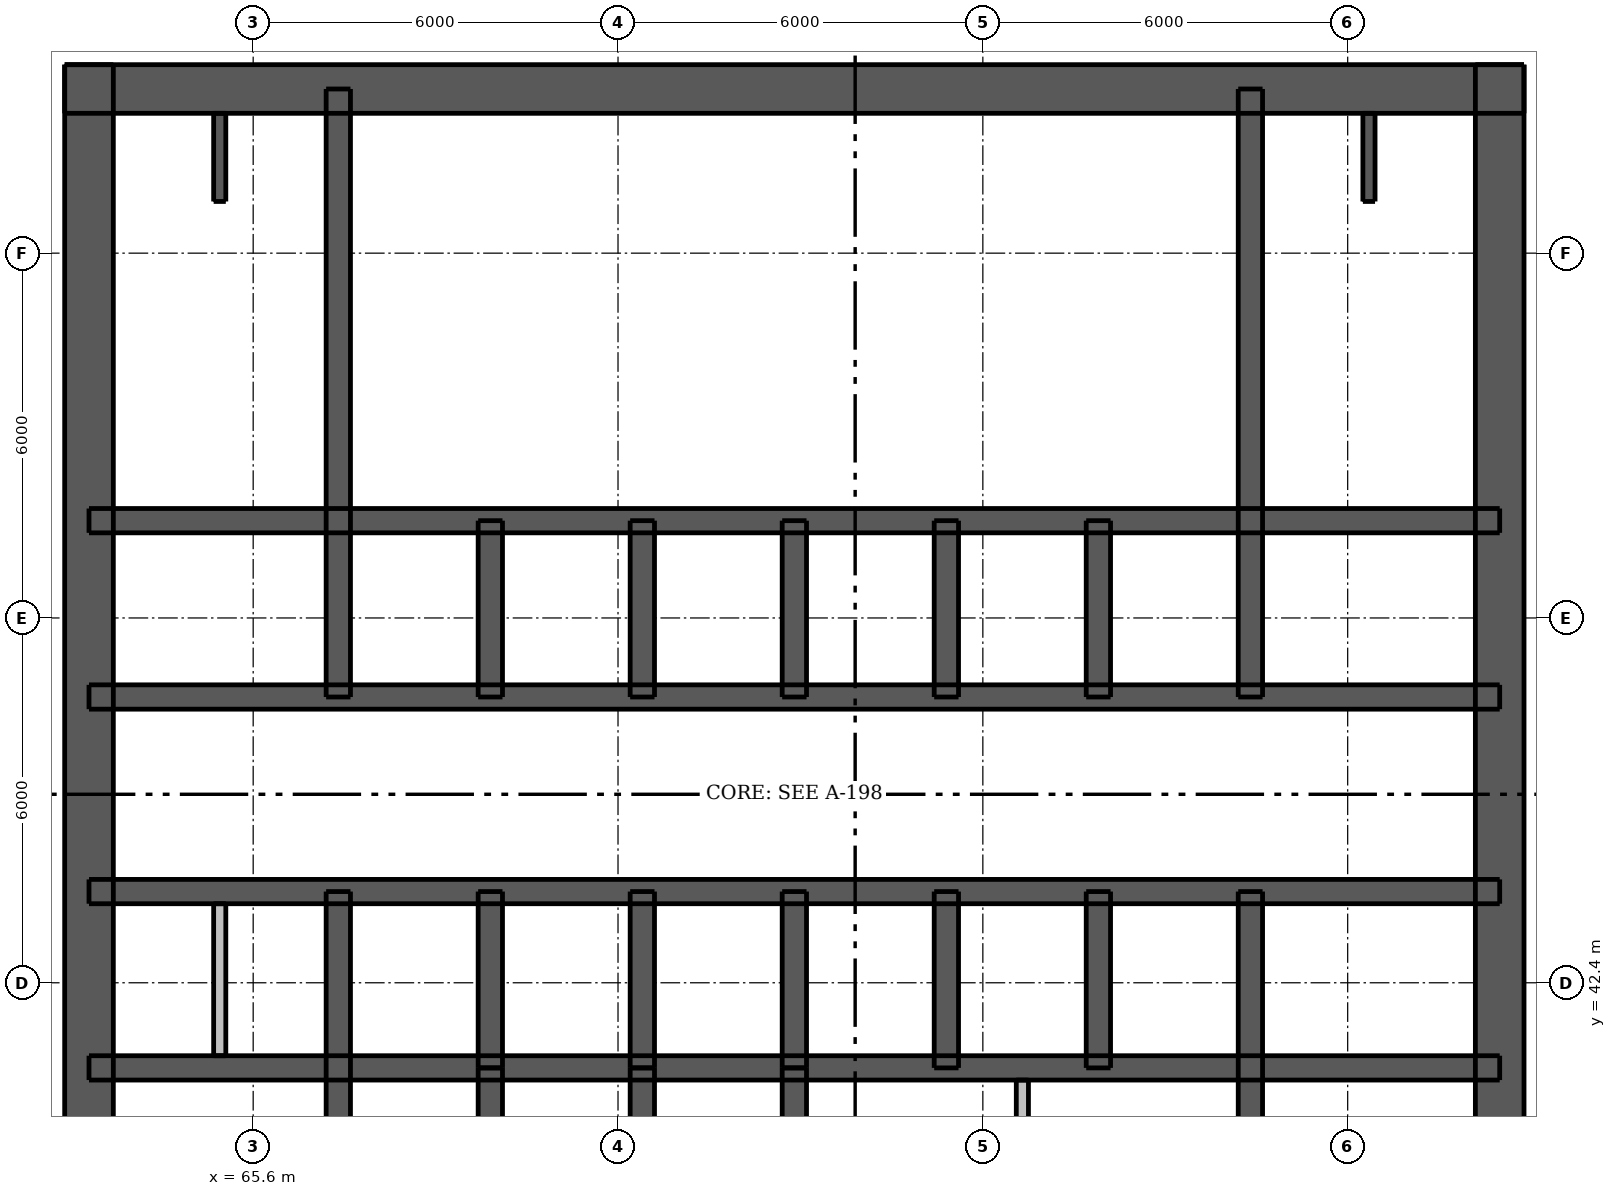
"""IFC4 building model, lengths in metres.
Left out: names, types, materials, properties, quantities, classifications, styles, units other than length and angle.
Written with IfcOpenShell. Run it as: python <this file> out.ifc"""

import sys

from ifc_helpers import new_model, si_unit, direction, frame, frame_2d, origin, place, context, subcontext, project, spatial, rectangle, extrude, element, fill, save


model = new_model("IFC4")
c1 = context("Model", 3, precision=1e-05, world=origin(), true_north=direction((0.0, 1.0)))
c2 = subcontext(c1, "Body", "Model", "MODEL_VIEW")
j1 = project(units=[si_unit("LENGTHUNIT", "METRE"), si_unit("PLANEANGLEUNIT", "RADIAN")], contexts=[c1])
p1 = place(None, origin())
s1 = spatial("IfcSite", under=j1, at=p1, CompositionType="ELEMENT")
p2 = place(p1, origin())
s2 = spatial("IfcBuilding", under=s1, at=p2, CompositionType="ELEMENT")
p3 = place(p2, frame((0.0, 0.0, 124.9)))
s3 = spatial("IfcBuildingStorey", under=s2, at=p3, CompositionType="ELEMENT", Elevation=124.9)
p4 = place(p3, frame((62.5, 57.1, 0.0), z_axis=(0.0, 0.0, 1.0), x_axis=(1.0, 0.0, 0.0)))
e1 = element("IfcWall", 1, at=p4, inside=s3, PredefinedType="SHEAR", context=c2, shape_type="SweptSolid", body=[
    extrude(rectangle(XDim=24.0, YDim=0.8, at=frame_2d((12.0, 0.0))), origin(), (0.0, 0.0, 1.0), 8.75),
])
p5 = place(p4, frame((19.9, 0.0, 0.0)))
e2 = element("IfcOpeningElement", 2, at=p5, cuts=e1, PredefinedType="OPENING", context=c2, shape_type="SweptSolid", body=[
    extrude(rectangle(XDim=1.1, YDim=2.1, at=frame_2d((0.55, 1.05))), frame((0.0, 0.41, 0.0), z_axis=(0.0, -1.0, 0.0), x_axis=(1.0, 0.0, 0.0)), (0.0, 0.0, 1.0), 0.82),
])
p6 = place(p4, frame((21.9, 0.0, 0.0)))
e3 = element("IfcOpeningElement", 3, at=p6, cuts=e1, PredefinedType="OPENING", context=c2, shape_type="SweptSolid", body=[
    extrude(rectangle(XDim=1.1, YDim=2.1, at=frame_2d((0.55, 1.05))), frame((0.0, 0.41, 0.0), z_axis=(0.0, -1.0, 0.0), x_axis=(1.0, 0.0, 0.0)), (0.0, 0.0, 1.0), 0.82),
])
p7 = place(p4, frame((1.0, 0.0, 0.0)))
e4 = element("IfcOpeningElement", 4, at=p7, cuts=e1, PredefinedType="OPENING", context=c2, shape_type="SweptSolid", body=[
    extrude(rectangle(XDim=1.1, YDim=2.1, at=frame_2d((0.55, 1.05))), frame((0.0, 0.41, 0.0), z_axis=(0.0, -1.0, 0.0), x_axis=(1.0, 0.0, 0.0)), (0.0, 0.0, 1.0), 0.82),
])
p8 = place(p4, frame((3.0, 0.0, 0.0)))
e5 = element("IfcOpeningElement", 5, at=p8, cuts=e1, PredefinedType="OPENING", context=c2, shape_type="SweptSolid", body=[
    extrude(rectangle(XDim=1.1, YDim=2.1, at=frame_2d((0.55, 1.05))), frame((0.0, 0.41, 0.0), z_axis=(0.0, -1.0, 0.0), x_axis=(1.0, 0.0, 0.0)), (0.0, 0.0, 1.0), 0.82),
])
p9 = place(p4, frame((11.55, 0.0, 0.0)))
e6 = element("IfcOpeningElement", 6, at=p9, cuts=e1, PredefinedType="OPENING", context=c2, shape_type="SweptSolid", body=[
    extrude(rectangle(XDim=0.9, YDim=2.1, at=frame_2d((0.45, 1.05))), frame((0.0, 0.41, 0.0), z_axis=(0.0, -1.0, 0.0), x_axis=(1.0, 0.0, 0.0)), (0.0, 0.0, 1.0), 0.82),
])
p10 = place(p3, frame((62.9, 33.5, 0.0), z_axis=(0.0, 0.0, 1.0), x_axis=(0.0, 1.0, 0.0)))
e7 = element("IfcWall", 7, at=p10, inside=s3, PredefinedType="SHEAR", context=c2, shape_type="SweptSolid", body=[
    extrude(rectangle(XDim=24.0, YDim=0.8, at=frame_2d((12.0, 0.0))), origin(), (0.0, 0.0, 1.0), 8.75),
])
p11 = place(p10, frame((11.2, 0.0, 0.0)))
e8 = element("IfcOpeningElement", 8, at=p11, cuts=e7, PredefinedType="OPENING", context=c2, shape_type="SweptSolid", body=[
    extrude(rectangle(XDim=1.6, YDim=2.1, at=frame_2d((0.8, 1.05))), frame((0.0, 0.41, 0.0), z_axis=(0.0, -1.0, 0.0), x_axis=(1.0, 0.0, 0.0)), (0.0, 0.0, 1.0), 0.82),
])
p12 = place(p3, frame((86.1, 33.5, 0.0), z_axis=(0.0, 0.0, 1.0), x_axis=(0.0, 1.0, 0.0)))
e9 = element("IfcWall", 9, at=p12, inside=s3, PredefinedType="SHEAR", context=c2, shape_type="SweptSolid", body=[
    extrude(rectangle(XDim=24.0, YDim=0.8, at=frame_2d((12.0, 0.0))), origin(), (0.0, 0.0, 1.0), 8.75),
])
p13 = place(p12, frame((11.2, 0.0, 0.0)))
e10 = element("IfcOpeningElement", 10, at=p13, cuts=e9, PredefinedType="OPENING", context=c2, shape_type="SweptSolid", body=[
    extrude(rectangle(XDim=1.6, YDim=2.1, at=frame_2d((0.8, 1.05))), frame((0.0, 0.41, 0.0), z_axis=(0.0, -1.0, 0.0), x_axis=(1.0, 0.0, 0.0)), (0.0, 0.0, 1.0), 0.82),
])
p14 = place(p3, frame((62.9, 41.0, 0.0), z_axis=(0.0, 0.0, 1.0), x_axis=(1.0, 0.0, 0.0)))
e11 = element("IfcWall", 11, at=p14, inside=s3, PredefinedType="SHEAR", context=c2, shape_type="SweptSolid", body=[
    extrude(rectangle(XDim=23.2, YDim=0.4, at=frame_2d((11.6, 0.0))), origin(), (0.0, 0.0, 1.0), 8.75),
])
p15 = place(p3, frame((62.9, 43.9, 0.0), z_axis=(0.0, 0.0, 1.0), x_axis=(1.0, 0.0, 0.0)))
e12 = element("IfcWall", 12, at=p15, inside=s3, PredefinedType="SHEAR", context=c2, shape_type="SweptSolid", body=[
    extrude(rectangle(XDim=23.2, YDim=0.4, at=frame_2d((11.6, 0.0))), origin(), (0.0, 0.0, 1.0), 8.75),
])
p16 = place(p15, frame((0.825, 0.0, 0.0)))
e13 = element("IfcOpeningElement", 13, at=p16, cuts=e12, PredefinedType="OPENING", context=c2, shape_type="SweptSolid", body=[
    extrude(rectangle(XDim=0.9, YDim=2.1, at=frame_2d((0.45, 1.05))), frame((0.0, 0.21, 0.0), z_axis=(0.0, -1.0, 0.0), x_axis=(1.0, 0.0, 0.0)), (0.0, 0.0, 1.0), 0.42),
])
p17 = place(p15, frame((2.575, 0.0, 0.0)))
e14 = element("IfcOpeningElement", 14, at=p17, cuts=e12, PredefinedType="OPENING", context=c2, shape_type="SweptSolid", body=[
    extrude(rectangle(XDim=0.9, YDim=2.1, at=frame_2d((0.45, 1.05))), frame((0.0, 0.21, 0.0), z_axis=(0.0, -1.0, 0.0), x_axis=(1.0, 0.0, 0.0)), (0.0, 0.0, 1.0), 0.42),
])
p18 = place(p15, frame((20.6, 0.0, 0.0)))
e15 = element("IfcOpeningElement", 15, at=p18, cuts=e12, PredefinedType="OPENING", context=c2, shape_type="SweptSolid", body=[
    extrude(rectangle(XDim=0.9, YDim=2.1, at=frame_2d((0.45, 1.05))), frame((0.0, 0.21, 0.0), z_axis=(0.0, -1.0, 0.0), x_axis=(1.0, 0.0, 0.0)), (0.0, 0.0, 1.0), 0.42),
])
p19 = place(p15, frame((4.8, 0.0, 0.0)))
e16 = element("IfcOpeningElement", 16, at=p19, cuts=e12, PredefinedType="OPENING", context=c2, shape_type="SweptSolid", body=[
    extrude(rectangle(XDim=1.1, YDim=2.1, at=frame_2d((0.55, 1.05))), frame((0.0, 0.21, 0.0), z_axis=(0.0, -1.0, 0.0), x_axis=(1.0, 0.0, 0.0)), (0.0, 0.0, 1.0), 0.42),
])
p20 = place(p15, frame((7.3, 0.0, 0.0)))
e17 = element("IfcOpeningElement", 17, at=p20, cuts=e12, PredefinedType="OPENING", context=c2, shape_type="SweptSolid", body=[
    extrude(rectangle(XDim=1.1, YDim=2.1, at=frame_2d((0.55, 1.05))), frame((0.0, 0.21, 0.0), z_axis=(0.0, -1.0, 0.0), x_axis=(1.0, 0.0, 0.0)), (0.0, 0.0, 1.0), 0.42),
])
p21 = place(p15, frame((9.8, 0.0, 0.0)))
e18 = element("IfcOpeningElement", 18, at=p21, cuts=e12, PredefinedType="OPENING", context=c2, shape_type="SweptSolid", body=[
    extrude(rectangle(XDim=1.1, YDim=2.1, at=frame_2d((0.55, 1.05))), frame((0.0, 0.21, 0.0), z_axis=(0.0, -1.0, 0.0), x_axis=(1.0, 0.0, 0.0)), (0.0, 0.0, 1.0), 0.42),
])
p22 = place(p15, frame((12.3, 0.0, 0.0)))
e19 = element("IfcOpeningElement", 19, at=p22, cuts=e12, PredefinedType="OPENING", context=c2, shape_type="SweptSolid", body=[
    extrude(rectangle(XDim=1.1, YDim=2.1, at=frame_2d((0.55, 1.05))), frame((0.0, 0.21, 0.0), z_axis=(0.0, -1.0, 0.0), x_axis=(1.0, 0.0, 0.0)), (0.0, 0.0, 1.0), 0.42),
])
p23 = place(p15, frame((14.8, 0.0, 0.0)))
e20 = element("IfcOpeningElement", 20, at=p23, cuts=e12, PredefinedType="OPENING", context=c2, shape_type="SweptSolid", body=[
    extrude(rectangle(XDim=1.1, YDim=2.1, at=frame_2d((0.55, 1.05))), frame((0.0, 0.21, 0.0), z_axis=(0.0, -1.0, 0.0), x_axis=(1.0, 0.0, 0.0)), (0.0, 0.0, 1.0), 0.42),
])
p24 = place(p15, frame((17.3, 0.0, 0.0)))
e21 = element("IfcOpeningElement", 21, at=p24, cuts=e12, PredefinedType="OPENING", context=c2, shape_type="SweptSolid", body=[
    extrude(rectangle(XDim=1.1, YDim=2.1, at=frame_2d((0.55, 1.05))), frame((0.0, 0.21, 0.0), z_axis=(0.0, -1.0, 0.0), x_axis=(1.0, 0.0, 0.0)), (0.0, 0.0, 1.0), 0.42),
])
p25 = place(p3, frame((62.9, 47.1, 0.0), z_axis=(0.0, 0.0, 1.0), x_axis=(1.0, 0.0, 0.0)))
e22 = element("IfcWall", 22, at=p25, inside=s3, PredefinedType="SHEAR", context=c2, shape_type="SweptSolid", body=[
    extrude(rectangle(XDim=23.2, YDim=0.4, at=frame_2d((11.6, 0.0))), origin(), (0.0, 0.0, 1.0), 8.75),
])
p26 = place(p25, frame((1.7, 0.0, 0.0)))
e23 = element("IfcOpeningElement", 23, at=p26, cuts=e22, PredefinedType="OPENING", context=c2, shape_type="SweptSolid", body=[
    extrude(rectangle(XDim=0.9, YDim=2.1, at=frame_2d((0.45, 1.05))), frame((0.0, 0.21, 0.0), z_axis=(0.0, -1.0, 0.0), x_axis=(1.0, 0.0, 0.0)), (0.0, 0.0, 1.0), 0.42),
])
p27 = place(p25, frame((20.6, 0.0, 0.0)))
e24 = element("IfcOpeningElement", 24, at=p27, cuts=e22, PredefinedType="OPENING", context=c2, shape_type="SweptSolid", body=[
    extrude(rectangle(XDim=0.9, YDim=2.1, at=frame_2d((0.45, 1.05))), frame((0.0, 0.21, 0.0), z_axis=(0.0, -1.0, 0.0), x_axis=(1.0, 0.0, 0.0)), (0.0, 0.0, 1.0), 0.42),
])
p28 = place(p3, frame((62.9, 50.0, 0.0), z_axis=(0.0, 0.0, 1.0), x_axis=(1.0, 0.0, 0.0)))
e25 = element("IfcWall", 25, at=p28, inside=s3, PredefinedType="SHEAR", context=c2, shape_type="SweptSolid", body=[
    extrude(rectangle(XDim=23.2, YDim=0.4, at=frame_2d((11.6, 0.0))), origin(), (0.0, 0.0, 1.0), 8.75),
])
for number, where, z_axis, x_axis in (
    (26, (67.0, 33.9, 0.0), (0.0, 0.0, 1.0), (0.0, 1.0, 0.0)),
    (27, (67.0, 47.1, 0.0), (0.0, 0.0, 1.0), (0.0, 1.0, 0.0)),
    (28, (82.0, 33.9, 0.0), (0.0, 0.0, 1.0), (0.0, 1.0, 0.0)),
    (29, (82.0, 47.1, 0.0), (0.0, 0.0, 1.0), (0.0, 1.0, 0.0)),
):
    element("IfcWall", number, at=place(p3, frame(where, z_axis=z_axis, x_axis=x_axis)), inside=s3, PredefinedType="SHEAR", context=c2, shape_type="SweptSolid", body=[
        extrude(rectangle(XDim=10.0, YDim=0.4, at=frame_2d((5.0, 0.0))), origin(), (0.0, 0.0, 1.0), 8.75),
    ])
for number, where, z_axis, x_axis in (
    (30, (69.5, 41.0, 0.0), (0.0, 0.0, 1.0), (0.0, 1.0, 0.0)),
    (31, (69.5, 47.1, 0.0), (0.0, 0.0, 1.0), (0.0, 1.0, 0.0)),
    (32, (72.0, 41.0, 0.0), (0.0, 0.0, 1.0), (0.0, 1.0, 0.0)),
    (33, (72.0, 47.1, 0.0), (0.0, 0.0, 1.0), (0.0, 1.0, 0.0)),
    (34, (74.5, 41.0, 0.0), (0.0, 0.0, 1.0), (0.0, 1.0, 0.0)),
    (35, (74.5, 47.1, 0.0), (0.0, 0.0, 1.0), (0.0, 1.0, 0.0)),
    (36, (77.0, 41.0, 0.0), (0.0, 0.0, 1.0), (0.0, 1.0, 0.0)),
    (37, (77.0, 47.1, 0.0), (0.0, 0.0, 1.0), (0.0, 1.0, 0.0)),
    (38, (79.5, 41.0, 0.0), (0.0, 0.0, 1.0), (0.0, 1.0, 0.0)),
    (39, (79.5, 47.1, 0.0), (0.0, 0.0, 1.0), (0.0, 1.0, 0.0)),
    (40, (69.5, 38.1, 0.0), (0.0, 0.0, 1.0), (0.0, 1.0, 0.0)),
    (41, (72.0, 38.1, 0.0), (0.0, 0.0, 1.0), (0.0, 1.0, 0.0)),
    (42, (74.5, 38.1, 0.0), (0.0, 0.0, 1.0), (0.0, 1.0, 0.0)),
):
    element("IfcWall", number, at=place(p3, frame(where, z_axis=z_axis, x_axis=x_axis)), inside=s3, PredefinedType="SHEAR", context=c2, shape_type="SweptSolid", body=[
        extrude(rectangle(XDim=2.9, YDim=0.4, at=frame_2d((1.45, 0.0))), origin(), (0.0, 0.0, 1.0), 8.75),
    ])
p29 = place(p3, frame((78.25, 34.3, 0.0), z_axis=(0.0, 0.0, 1.0), x_axis=(0.0, 1.0, 0.0)))
e43 = element("IfcWall", 43, at=p29, inside=s3, PredefinedType="PLUMBINGWALL", context=c2, shape_type="SweptSolid", body=[
    extrude(rectangle(XDim=6.5, YDim=0.2, at=frame_2d((3.25, 0.0))), origin(), (0.0, 0.0, 1.0), 8.75),
])
p30 = place(p3, frame((65.05, 41.2, 0.0), z_axis=(0.0, 0.0, 1.0), x_axis=(0.0, 1.0, 0.0)))
e44 = element("IfcWall", 44, at=p30, inside=s3, PredefinedType="PLUMBINGWALL", context=c2, shape_type="SweptSolid", body=[
    extrude(rectangle(XDim=2.5, YDim=0.2, at=frame_2d((1.25, 0.0))), origin(), (0.0, 0.0, 1.0), 8.75),
])
for number, where, z_axis, x_axis in (
    (45, (83.95, 56.7, 0.0), (0.0, 0.0, 1.0), (0.0, -1.0, 0.0)),
    (46, (65.05, 56.7, 0.0), (0.0, 0.0, 1.0), (0.0, -1.0, 0.0)),
):
    element("IfcWall", number, at=place(p3, frame(where, z_axis=z_axis, x_axis=x_axis)), inside=s3, PredefinedType="SHEAR", context=c2, shape_type="SweptSolid", body=[
        extrude(rectangle(XDim=1.45, YDim=0.2, at=frame_2d((0.725, 0.0))), origin(), (0.0, 0.0, 1.0), 8.75),
    ])
p31 = place(p5, origin())
e47 = element("IfcDoor", 47, at=p31, inside=s3, OperationType="SINGLE_SWING_RIGHT", PredefinedType="DOOR", context=c2, shape_type="SweptSolid", body=[
    extrude(rectangle(XDim=1.1, YDim=2.1, at=frame_2d((0.55, 1.05))), frame((0.0, -0.337, 0.0), z_axis=(0.0, -1.0, 0.0), x_axis=(1.0, 0.0, 0.0)), (0.0, 0.0, 1.0), 0.05),
])
fill(e2, e47)
p32 = place(p6, origin())
e48 = element("IfcDoor", 48, at=p32, inside=s3, OperationType="SINGLE_SWING_RIGHT", PredefinedType="DOOR", context=c2, shape_type="SweptSolid", body=[
    extrude(rectangle(XDim=1.1, YDim=2.1, at=frame_2d((0.55, 1.05))), frame((0.0, -0.337, 0.0), z_axis=(0.0, -1.0, 0.0), x_axis=(1.0, 0.0, 0.0)), (0.0, 0.0, 1.0), 0.05),
])
fill(e3, e48)
p33 = place(p7, origin())
e49 = element("IfcDoor", 49, at=p33, inside=s3, OperationType="SINGLE_SWING_LEFT", PredefinedType="DOOR", context=c2, shape_type="SweptSolid", body=[
    extrude(rectangle(XDim=1.1, YDim=2.1, at=frame_2d((0.55, 1.05))), frame((0.0, -0.337, 0.0), z_axis=(0.0, -1.0, 0.0), x_axis=(1.0, 0.0, 0.0)), (0.0, 0.0, 1.0), 0.05),
])
fill(e4, e49)
p34 = place(p8, origin())
e50 = element("IfcDoor", 50, at=p34, inside=s3, OperationType="SINGLE_SWING_LEFT", PredefinedType="DOOR", context=c2, shape_type="SweptSolid", body=[
    extrude(rectangle(XDim=1.1, YDim=2.1, at=frame_2d((0.55, 1.05))), frame((0.0, -0.337, 0.0), z_axis=(0.0, -1.0, 0.0), x_axis=(1.0, 0.0, 0.0)), (0.0, 0.0, 1.0), 0.05),
])
fill(e5, e50)
p35 = place(p11, origin())
e51 = element("IfcDoor", 51, at=p35, inside=s3, OperationType="DOUBLE_DOOR_SINGLE_SWING", PredefinedType="DOOR", context=c2, shape_type="SweptSolid", body=[
    extrude(rectangle(XDim=1.6, YDim=2.1, at=frame_2d((0.8, 1.05))), frame((0.0, -0.337, 0.0), z_axis=(0.0, -1.0, 0.0), x_axis=(1.0, 0.0, 0.0)), (0.0, 0.0, 1.0), 0.05),
])
fill(e8, e51)
p36 = place(p13, origin())
e52 = element("IfcDoor", 52, at=p36, inside=s3, OperationType="DOUBLE_DOOR_SINGLE_SWING", PredefinedType="DOOR", context=c2, shape_type="SweptSolid", body=[
    extrude(rectangle(XDim=1.6, YDim=2.1, at=frame_2d((0.8, 1.05))), frame((0.0, 0.388, 0.0), z_axis=(0.0, -1.0, 0.0), x_axis=(1.0, 0.0, 0.0)), (0.0, 0.0, 1.0), 0.05),
])
fill(e10, e52)
p37 = place(p16, origin())
e53 = element("IfcDoor", 53, at=p37, inside=s3, OperationType="SINGLE_SWING_LEFT", PredefinedType="DOOR", context=c2, shape_type="SweptSolid", body=[
    extrude(rectangle(XDim=0.9, YDim=2.1, at=frame_2d((0.45, 1.05))), frame((0.0, -0.138, 0.0), z_axis=(0.0, -1.0, 0.0), x_axis=(1.0, 0.0, 0.0)), (0.0, 0.0, 1.0), 0.05),
])
fill(e13, e53)
p38 = place(p17, origin())
e54 = element("IfcDoor", 54, at=p38, inside=s3, OperationType="SINGLE_SWING_RIGHT", PredefinedType="DOOR", context=c2, shape_type="SweptSolid", body=[
    extrude(rectangle(XDim=0.9, YDim=2.1, at=frame_2d((0.45, 1.05))), frame((0.0, -0.138, 0.0), z_axis=(0.0, -1.0, 0.0), x_axis=(1.0, 0.0, 0.0)), (0.0, 0.0, 1.0), 0.05),
])
fill(e14, e54)
p39 = place(p18, origin())
e55 = element("IfcDoor", 55, at=p39, inside=s3, OperationType="SINGLE_SWING_LEFT", PredefinedType="DOOR", context=c2, shape_type="SweptSolid", body=[
    extrude(rectangle(XDim=0.9, YDim=2.1, at=frame_2d((0.45, 1.05))), frame((0.0, -0.138, 0.0), z_axis=(0.0, -1.0, 0.0), x_axis=(1.0, 0.0, 0.0)), (0.0, 0.0, 1.0), 0.05),
])
fill(e15, e55)
p40 = place(p26, origin())
e56 = element("IfcDoor", 56, at=p40, inside=s3, OperationType="SINGLE_SWING_LEFT", PredefinedType="DOOR", context=c2, shape_type="SweptSolid", body=[
    extrude(rectangle(XDim=0.9, YDim=2.1, at=frame_2d((0.45, 1.05))), frame((0.0, 0.188, 0.0), z_axis=(0.0, -1.0, 0.0), x_axis=(1.0, 0.0, 0.0)), (0.0, 0.0, 1.0), 0.05),
])
fill(e23, e56)
p41 = place(p27, origin())
e57 = element("IfcDoor", 57, at=p41, inside=s3, OperationType="SINGLE_SWING_LEFT", PredefinedType="DOOR", context=c2, shape_type="SweptSolid", body=[
    extrude(rectangle(XDim=0.9, YDim=2.1, at=frame_2d((0.45, 1.05))), frame((0.0, 0.188, 0.0), z_axis=(0.0, -1.0, 0.0), x_axis=(1.0, 0.0, 0.0)), (0.0, 0.0, 1.0), 0.05),
])
fill(e24, e57)
p42 = place(p9, origin())
e58 = element("IfcDoor", 58, at=p42, inside=s3, OperationType="SINGLE_SWING_RIGHT", PredefinedType="DOOR", context=c2, shape_type="SweptSolid", body=[
    extrude(rectangle(XDim=0.9, YDim=2.1, at=frame_2d((0.45, 1.05))), frame((0.0, -0.337, 0.0), z_axis=(0.0, -1.0, 0.0), x_axis=(1.0, 0.0, 0.0)), (0.0, 0.0, 1.0), 0.05),
])
fill(e6, e58)
p43 = place(p19, origin())
e59 = element("IfcDoor", 59, at=p43, inside=s3, OperationType="DOUBLE_DOOR_SLIDING", PredefinedType="DOOR", context=c2, shape_type="SweptSolid", body=[
    extrude(rectangle(XDim=1.1, YDim=2.1, at=frame_2d((0.55, 1.05))), frame((0.0, 0.025, 0.0), z_axis=(0.0, -1.0, 0.0), x_axis=(1.0, 0.0, 0.0)), (0.0, 0.0, 1.0), 0.05),
])
fill(e16, e59)
p44 = place(p20, origin())
e60 = element("IfcDoor", 60, at=p44, inside=s3, OperationType="DOUBLE_DOOR_SLIDING", PredefinedType="DOOR", context=c2, shape_type="SweptSolid", body=[
    extrude(rectangle(XDim=1.1, YDim=2.1, at=frame_2d((0.55, 1.05))), frame((0.0, 0.025, 0.0), z_axis=(0.0, -1.0, 0.0), x_axis=(1.0, 0.0, 0.0)), (0.0, 0.0, 1.0), 0.05),
])
fill(e17, e60)
p45 = place(p21, origin())
e61 = element("IfcDoor", 61, at=p45, inside=s3, OperationType="DOUBLE_DOOR_SLIDING", PredefinedType="DOOR", context=c2, shape_type="SweptSolid", body=[
    extrude(rectangle(XDim=1.1, YDim=2.1, at=frame_2d((0.55, 1.05))), frame((0.0, 0.025, 0.0), z_axis=(0.0, -1.0, 0.0), x_axis=(1.0, 0.0, 0.0)), (0.0, 0.0, 1.0), 0.05),
])
fill(e18, e61)
p46 = place(p22, origin())
e62 = element("IfcDoor", 62, at=p46, inside=s3, OperationType="DOUBLE_DOOR_SLIDING", PredefinedType="DOOR", context=c2, shape_type="SweptSolid", body=[
    extrude(rectangle(XDim=1.1, YDim=2.1, at=frame_2d((0.55, 1.05))), frame((0.0, 0.025, 0.0), z_axis=(0.0, -1.0, 0.0), x_axis=(1.0, 0.0, 0.0)), (0.0, 0.0, 1.0), 0.05),
])
fill(e19, e62)
p47 = place(p23, origin())
e63 = element("IfcDoor", 63, at=p47, inside=s3, OperationType="DOUBLE_DOOR_SLIDING", PredefinedType="DOOR", context=c2, shape_type="SweptSolid", body=[
    extrude(rectangle(XDim=1.1, YDim=2.1, at=frame_2d((0.55, 1.05))), frame((0.0, 0.025, 0.0), z_axis=(0.0, -1.0, 0.0), x_axis=(1.0, 0.0, 0.0)), (0.0, 0.0, 1.0), 0.05),
])
fill(e20, e63)
p48 = place(p24, origin())
e64 = element("IfcDoor", 64, at=p48, inside=s3, OperationType="DOUBLE_DOOR_SLIDING", PredefinedType="DOOR", context=c2, shape_type="SweptSolid", body=[
    extrude(rectangle(XDim=1.1, YDim=2.1, at=frame_2d((0.55, 1.05))), frame((0.0, 0.025, 0.0), z_axis=(0.0, -1.0, 0.0), x_axis=(1.0, 0.0, 0.0)), (0.0, 0.0, 1.0), 0.05),
])
fill(e21, e64)
save(model, sys.argv[1])
